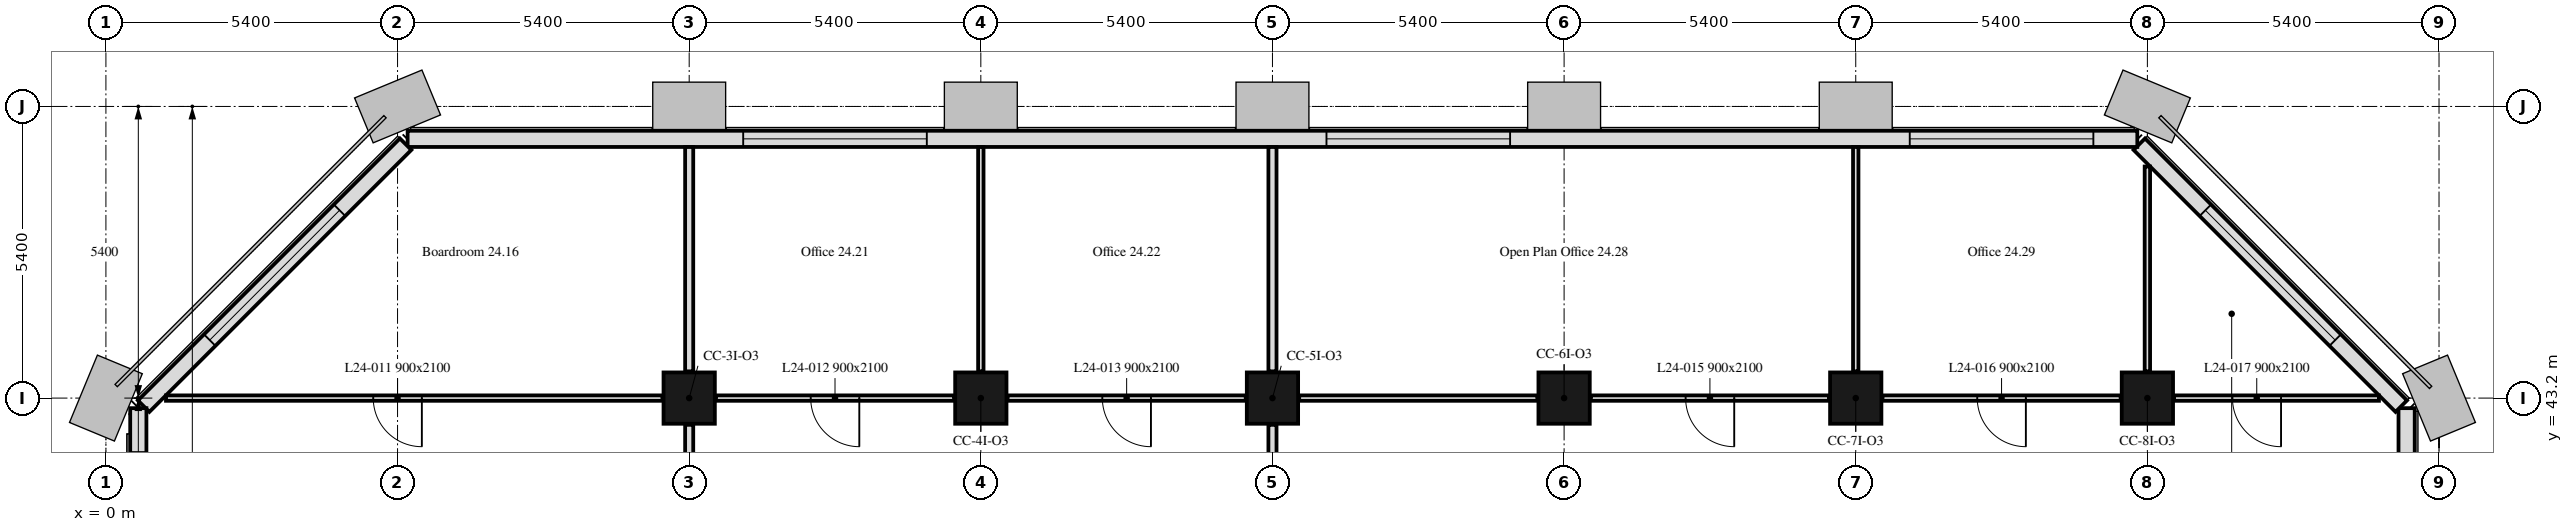
"""IFC4 building model, lengths in metres.
Left out: names, types, materials, properties, quantities, classifications, styles, units other than length and angle.
Written with IfcOpenShell. Run it as: python <this file> out.ifc"""

import sys

from ifc_helpers import new_model, si_unit, direction, frame, frame_2d, origin, origin_2d, place, context, subcontext, project, spatial, rectangle, extrude, element, fill, save


model = new_model("IFC4")
c1 = context("Model", 3, precision=1e-05, world=origin(), true_north=direction((0.0, 1.0)))
c2 = subcontext(c1, "Body", "Model", "MODEL_VIEW")
j1 = project(units=[si_unit("LENGTHUNIT", "METRE"), si_unit("PLANEANGLEUNIT", "RADIAN")], contexts=[c1])
p1 = place(None, origin())
s1 = spatial("IfcSite", under=j1, at=p1, CompositionType="ELEMENT")
p2 = place(p1, origin())
s2 = spatial("IfcBuilding", under=s1, at=p2, CompositionType="ELEMENT")
p3 = place(p2, frame((0.0, 0.0, 103.0)))
s3 = spatial("IfcBuildingStorey", under=s2, at=p3, CompositionType="ELEMENT", Elevation=103.0)
for number, where, z_axis, x_axis in (
    (1, (10.8, 43.2, 0.0), (0.0, 0.0, 1.0), (1.0, 0.0, 0.0)),
    (2, (16.2, 43.2, 0.0), (0.0, 0.0, 1.0), (1.0, 0.0, 0.0)),
    (3, (21.6, 43.2, 0.0), (0.0, 0.0, 1.0), (1.0, 0.0, 0.0)),
    (4, (27.0, 43.2, 0.0), (0.0, 0.0, 1.0), (1.0, 0.0, 0.0)),
    (5, (32.4, 43.2, 0.0), (0.0, 0.0, 1.0), (1.0, 0.0, 0.0)),
    (6, (37.8, 43.2, 0.0), (0.0, 0.0, 1.0), (1.0, 0.0, 0.0)),
):
    element("IfcColumn", number, at=place(p3, frame(where, z_axis=z_axis, x_axis=x_axis)), inside=s3, PredefinedType="COLUMN", context=c2, shape_type="SweptSolid", body=[
        extrude(rectangle(XDim=0.95, YDim=0.95, at=origin_2d()), origin(), (0.0, 0.0, 1.0), 3.5),
    ])
p4 = place(p3, frame((42.6, 32.4, 0.0), z_axis=(0.0, 0.0, 1.0), x_axis=(0.0, 1.0, 0.0)))
e7 = element("IfcWall", 7, at=p4, inside=s3, PredefinedType="SOLIDWALL", context=c2, shape_type="SweptSolid", body=[
    extrude(rectangle(XDim=10.614, YDim=0.3, at=frame_2d((5.307, 0.0))), origin(), (0.0, 0.0, 1.0), 3.5),
])
p5 = place(p4, frame((1.35, 0.0, 0.9)))
e8 = element("IfcOpeningElement", 8, at=p5, cuts=e7, PredefinedType="OPENING", context=c2, shape_type="SweptSolid", body=[
    extrude(rectangle(XDim=1.1, YDim=1.7, at=frame_2d((0.55, 0.85))), frame((0.0, 0.16, 0.0), z_axis=(0.0, -1.0, 0.0), x_axis=(1.0, 0.0, 0.0)), (0.0, 0.0, 1.0), 0.32),
])
p6 = place(p4, frame((2.95, 0.0, 0.9)))
e9 = element("IfcOpeningElement", 9, at=p6, cuts=e7, PredefinedType="OPENING", context=c2, shape_type="SweptSolid", body=[
    extrude(rectangle(XDim=1.1, YDim=1.7, at=frame_2d((0.55, 0.85))), frame((0.0, 0.16, 0.0), z_axis=(0.0, -1.0, 0.0), x_axis=(1.0, 0.0, 0.0)), (0.0, 0.0, 1.0), 0.32),
])
p7 = place(p3, frame((42.501, 43.051, 0.0), z_axis=(0.0, 0.0, 1.0), x_axis=(-0.707106781187, 0.707106781187, 0.0)))
e10 = element("IfcWall", 10, at=p7, inside=s3, PredefinedType="SOLIDWALL", context=c2, shape_type="SweptSolid", body=[
    extrude(rectangle(XDim=6.86, YDim=0.3, at=frame_2d((3.43, 0.0))), origin(), (0.0, 0.0, 1.0), 3.5),
])
p8 = place(p7, frame((1.73, 0.0, 0.9)))
e11 = element("IfcOpeningElement", 11, at=p8, cuts=e10, PredefinedType="OPENING", context=c2, shape_type="SweptSolid", body=[
    extrude(rectangle(XDim=3.4, YDim=1.7, at=frame_2d((1.7, 0.85))), frame((0.0, 0.16, 0.0), z_axis=(0.0, -1.0, 0.0), x_axis=(1.0, 0.0, 0.0)), (0.0, 0.0, 1.0), 0.32),
])
p9 = place(p3, frame((37.614, 48.0, 0.0), z_axis=(0.0, 0.0, 1.0), x_axis=(-1.0, 0.0, 0.0)))
e12 = element("IfcWall", 12, at=p9, inside=s3, PredefinedType="SOLIDWALL", context=c2, shape_type="SweptSolid", body=[
    extrude(rectangle(XDim=32.027, YDim=0.3, at=frame_2d((16.014, 0.0))), origin(), (0.0, 0.0, 1.0), 3.5),
])
p10 = place(p9, frame((0.814, 0.0, 0.9)))
e13 = element("IfcOpeningElement", 13, at=p10, cuts=e12, PredefinedType="OPENING", context=c2, shape_type="SweptSolid", body=[
    extrude(rectangle(XDim=3.4, YDim=1.7, at=frame_2d((1.7, 0.85))), frame((0.0, 0.16, 0.0), z_axis=(0.0, -1.0, 0.0), x_axis=(1.0, 0.0, 0.0)), (0.0, 0.0, 1.0), 0.32),
])
p11 = place(p9, frame((11.614, 0.0, 0.9)))
e14 = element("IfcOpeningElement", 14, at=p11, cuts=e12, PredefinedType="OPENING", context=c2, shape_type="SweptSolid", body=[
    extrude(rectangle(XDim=3.4, YDim=1.7, at=frame_2d((1.7, 0.85))), frame((0.0, 0.16, 0.0), z_axis=(0.0, -1.0, 0.0), x_axis=(1.0, 0.0, 0.0)), (0.0, 0.0, 1.0), 0.32),
])
p12 = place(p9, frame((22.414, 0.0, 0.9)))
e15 = element("IfcOpeningElement", 15, at=p12, cuts=e12, PredefinedType="OPENING", context=c2, shape_type="SweptSolid", body=[
    extrude(rectangle(XDim=3.4, YDim=1.7, at=frame_2d((1.7, 0.85))), frame((0.0, 0.16, 0.0), z_axis=(0.0, -1.0, 0.0), x_axis=(1.0, 0.0, 0.0)), (0.0, 0.0, 1.0), 0.32),
])
p13 = place(p3, frame((5.55, 47.901, 0.0), z_axis=(0.0, 0.0, 1.0), x_axis=(-0.707106781187, -0.707106781187, 0.0)))
e16 = element("IfcWall", 16, at=p13, inside=s3, PredefinedType="SOLIDWALL", context=c2, shape_type="SweptSolid", body=[
    extrude(rectangle(XDim=6.86, YDim=0.3, at=frame_2d((3.43, 0.0))), origin(), (0.0, 0.0, 1.0), 3.5),
])
p14 = place(p13, frame((1.73, 0.0, 0.9)))
e17 = element("IfcOpeningElement", 17, at=p14, cuts=e16, PredefinedType="OPENING", context=c2, shape_type="SweptSolid", body=[
    extrude(rectangle(XDim=3.4, YDim=1.7, at=frame_2d((1.7, 0.85))), frame((0.0, 0.16, 0.0), z_axis=(0.0, -1.0, 0.0), x_axis=(1.0, 0.0, 0.0)), (0.0, 0.0, 1.0), 0.32),
])
p15 = place(p3, frame((0.6, 43.014, 0.0), z_axis=(0.0, 0.0, 1.0), x_axis=(0.0, -1.0, 0.0)))
e18 = element("IfcWall", 18, at=p15, inside=s3, PredefinedType="SOLIDWALL", context=c2, shape_type="SweptSolid", body=[
    extrude(rectangle(XDim=32.027, YDim=0.3, at=frame_2d((16.014, 0.0))), origin(), (0.0, 0.0, 1.0), 3.5),
])
p16 = place(p15, frame((0.814, 0.0, 0.9)))
e19 = element("IfcOpeningElement", 19, at=p16, cuts=e18, PredefinedType="OPENING", context=c2, shape_type="SweptSolid", body=[
    extrude(rectangle(XDim=3.4, YDim=1.7, at=frame_2d((1.7, 0.85))), frame((0.0, 0.16, 0.0), z_axis=(0.0, -1.0, 0.0), x_axis=(1.0, 0.0, 0.0)), (0.0, 0.0, 1.0), 0.32),
])
p17 = place(p15, frame((11.614, 0.0, 0.9)))
e20 = element("IfcOpeningElement", 20, at=p17, cuts=e18, PredefinedType="OPENING", context=c2, shape_type="SweptSolid", body=[
    extrude(rectangle(XDim=3.4, YDim=1.7, at=frame_2d((1.7, 0.85))), frame((0.0, 0.16, 0.0), z_axis=(0.0, -1.0, 0.0), x_axis=(1.0, 0.0, 0.0)), (0.0, 0.0, 1.0), 0.32),
])
p18 = place(p15, frame((22.414, 0.0, 0.9)))
e21 = element("IfcOpeningElement", 21, at=p18, cuts=e18, PredefinedType="OPENING", context=c2, shape_type="SweptSolid", body=[
    extrude(rectangle(XDim=3.4, YDim=1.7, at=frame_2d((1.7, 0.85))), frame((0.0, 0.16, 0.0), z_axis=(0.0, -1.0, 0.0), x_axis=(1.0, 0.0, 0.0)), (0.0, 0.0, 1.0), 0.32),
])
p19 = place(p3, frame((10.305, 43.2, 0.0), z_axis=(0.0, 0.0, 1.0), x_axis=(-1.0, 0.0, 0.0)))
e22 = element("IfcWall", 22, at=p19, inside=s3, PredefinedType="PARTITIONING", context=c2, shape_type="SweptSolid", body=[
    extrude(rectangle(XDim=9.193, YDim=0.1, at=frame_2d((4.596, 0.0))), origin(), (0.0, 0.0, 1.0), 3.5),
])
p20 = place(p19, frame((4.455, 0.0, 0.0)))
e23 = element("IfcOpeningElement", 23, at=p20, cuts=e22, PredefinedType="OPENING", context=c2, shape_type="SweptSolid", body=[
    extrude(rectangle(XDim=0.9, YDim=2.1, at=frame_2d((0.45, 1.05))), frame((0.0, 0.05, 0.0), z_axis=(0.0, -1.0, 0.0), x_axis=(1.0, 0.0, 0.0)), (0.0, 0.0, 1.0), 0.1),
])
p21 = place(p3, frame((10.8, 38.295, 0.0), z_axis=(0.0, 0.0, 1.0), x_axis=(0.0, 1.0, 0.0)))
e24 = element("IfcWall", 24, at=p21, inside=s3, PredefinedType="PARTITIONING", context=c2, shape_type="SweptSolid", body=[
    extrude(rectangle(XDim=4.41, YDim=0.15, at=frame_2d((2.205, 0.0))), origin(), (0.0, 0.0, 1.0), 2.75),
])
p22 = place(p3, frame((10.8, 43.695, 0.0), z_axis=(0.0, 0.0, 1.0), x_axis=(0.0, 1.0, 0.0)))
e25 = element("IfcWall", 25, at=p22, inside=s3, PredefinedType="PARTITIONING", context=c2, shape_type="SweptSolid", body=[
    extrude(rectangle(XDim=4.154, YDim=0.15, at=frame_2d((2.077, 0.0))), origin(), (0.0, 0.0, 1.0), 2.75),
])
p23 = place(p3, frame((21.6, 38.295, 0.0), z_axis=(0.0, 0.0, 1.0), x_axis=(0.0, 1.0, 0.0)))
e26 = element("IfcWall", 26, at=p23, inside=s3, PredefinedType="PARTITIONING", context=c2, shape_type="SweptSolid", body=[
    extrude(rectangle(XDim=4.41, YDim=0.15, at=frame_2d((2.205, 0.0))), origin(), (0.0, 0.0, 1.0), 2.75),
])
p24 = place(p3, frame((21.105, 43.2, 0.0), z_axis=(0.0, 0.0, 1.0), x_axis=(-1.0, 0.0, 0.0)))
e27 = element("IfcWall", 27, at=p24, inside=s3, PredefinedType="PARTITIONING", context=c2, shape_type="SweptSolid", body=[
    extrude(rectangle(XDim=4.41, YDim=0.1, at=frame_2d((2.205, 0.0))), origin(), (0.0, 0.0, 1.0), 3.5),
])
p25 = place(p24, frame((1.755, 0.0, 0.0)))
e28 = element("IfcOpeningElement", 28, at=p25, cuts=e27, PredefinedType="OPENING", context=c2, shape_type="SweptSolid", body=[
    extrude(rectangle(XDim=0.9, YDim=2.1, at=frame_2d((0.45, 1.05))), frame((0.0, 0.05, 0.0), z_axis=(0.0, -1.0, 0.0), x_axis=(1.0, 0.0, 0.0)), (0.0, 0.0, 1.0), 0.1),
])
p26 = place(p3, frame((15.705, 43.2, 0.0), z_axis=(0.0, 0.0, 1.0), x_axis=(-1.0, 0.0, 0.0)))
e29 = element("IfcWall", 29, at=p26, inside=s3, PredefinedType="PARTITIONING", context=c2, shape_type="SweptSolid", body=[
    extrude(rectangle(XDim=4.41, YDim=0.1, at=frame_2d((2.205, 0.0))), origin(), (0.0, 0.0, 1.0), 3.5),
])
p27 = place(p26, frame((1.755, 0.0, 0.0)))
e30 = element("IfcOpeningElement", 30, at=p27, cuts=e29, PredefinedType="OPENING", context=c2, shape_type="SweptSolid", body=[
    extrude(rectangle(XDim=0.9, YDim=2.1, at=frame_2d((0.45, 1.05))), frame((0.0, 0.05, 0.0), z_axis=(0.0, -1.0, 0.0), x_axis=(1.0, 0.0, 0.0)), (0.0, 0.0, 1.0), 0.1),
])
p28 = place(p3, frame((16.2, 43.695, 0.0), z_axis=(0.0, 0.0, 1.0), x_axis=(0.0, 1.0, 0.0)))
e31 = element("IfcWall", 31, at=p28, inside=s3, PredefinedType="PARTITIONING", context=c2, shape_type="SweptSolid", body=[
    extrude(rectangle(XDim=4.154, YDim=0.1, at=frame_2d((2.077, 0.0))), origin(), (0.0, 0.0, 1.0), 2.75),
])
p29 = place(p3, frame((21.6, 43.695, 0.0), z_axis=(0.0, 0.0, 1.0), x_axis=(0.0, 1.0, 0.0)))
e32 = element("IfcWall", 32, at=p29, inside=s3, PredefinedType="PARTITIONING", context=c2, shape_type="SweptSolid", body=[
    extrude(rectangle(XDim=4.154, YDim=0.15, at=frame_2d((2.077, 0.0))), origin(), (0.0, 0.0, 1.0), 2.75),
])
p30 = place(p3, frame((42.088, 43.2, 0.0), z_axis=(0.0, 0.0, 1.0), x_axis=(-1.0, 0.0, 0.0)))
e33 = element("IfcWall", 33, at=p30, inside=s3, PredefinedType="PARTITIONING", context=c2, shape_type="SweptSolid", body=[
    extrude(rectangle(XDim=3.793, YDim=0.1, at=frame_2d((1.896, 0.0))), origin(), (0.0, 0.0, 1.0), 3.5),
])
p31 = place(p30, frame((1.813, 0.0, 0.0)))
e34 = element("IfcOpeningElement", 34, at=p31, cuts=e33, PredefinedType="OPENING", context=c2, shape_type="SweptSolid", body=[
    extrude(rectangle(XDim=0.9, YDim=2.1, at=frame_2d((0.45, 1.05))), frame((0.0, 0.05, 0.0), z_axis=(0.0, -1.0, 0.0), x_axis=(1.0, 0.0, 0.0)), (0.0, 0.0, 1.0), 0.1),
])
p32 = place(p3, frame((37.305, 43.2, 0.0), z_axis=(0.0, 0.0, 1.0), x_axis=(-1.0, 0.0, 0.0)))
e35 = element("IfcWall", 35, at=p32, inside=s3, PredefinedType="PARTITIONING", context=c2, shape_type="SweptSolid", body=[
    extrude(rectangle(XDim=4.41, YDim=0.1, at=frame_2d((2.205, 0.0))), origin(), (0.0, 0.0, 1.0), 3.5),
])
p33 = place(p32, frame((1.755, 0.0, 0.0)))
e36 = element("IfcOpeningElement", 36, at=p33, cuts=e35, PredefinedType="OPENING", context=c2, shape_type="SweptSolid", body=[
    extrude(rectangle(XDim=0.9, YDim=2.1, at=frame_2d((0.45, 1.05))), frame((0.0, 0.05, 0.0), z_axis=(0.0, -1.0, 0.0), x_axis=(1.0, 0.0, 0.0)), (0.0, 0.0, 1.0), 0.1),
])
p34 = place(p3, frame((31.905, 43.2, 0.0), z_axis=(0.0, 0.0, 1.0), x_axis=(-1.0, 0.0, 0.0)))
e37 = element("IfcWall", 37, at=p34, inside=s3, PredefinedType="PARTITIONING", context=c2, shape_type="SweptSolid", body=[
    extrude(rectangle(XDim=4.41, YDim=0.1, at=frame_2d((2.205, 0.0))), origin(), (0.0, 0.0, 1.0), 3.5),
])
p35 = place(p34, frame((1.755, 0.0, 0.0)))
e38 = element("IfcOpeningElement", 38, at=p35, cuts=e37, PredefinedType="OPENING", context=c2, shape_type="SweptSolid", body=[
    extrude(rectangle(XDim=0.9, YDim=2.1, at=frame_2d((0.45, 1.05))), frame((0.0, 0.05, 0.0), z_axis=(0.0, -1.0, 0.0), x_axis=(1.0, 0.0, 0.0)), (0.0, 0.0, 1.0), 0.1),
])
p36 = place(p3, frame((26.505, 43.2, 0.0), z_axis=(0.0, 0.0, 1.0), x_axis=(-1.0, 0.0, 0.0)))
e39 = element("IfcWall", 39, at=p36, inside=s3, PredefinedType="PARTITIONING", context=c2, shape_type="SweptSolid", body=[
    extrude(rectangle(XDim=4.41, YDim=0.1, at=frame_2d((2.205, 0.0))), origin(), (0.0, 0.0, 1.0), 3.5),
])
p37 = place(p3, frame((32.4, 43.695, 0.0), z_axis=(0.0, 0.0, 1.0), x_axis=(0.0, 1.0, 0.0)))
e40 = element("IfcWall", 40, at=p37, inside=s3, PredefinedType="PARTITIONING", context=c2, shape_type="SweptSolid", body=[
    extrude(rectangle(XDim=4.154, YDim=0.1, at=frame_2d((2.077, 0.0))), origin(), (0.0, 0.0, 1.0), 2.75),
])
p38 = place(p3, frame((37.8, 43.695, 0.0), z_axis=(0.0, 0.0, 1.0), x_axis=(0.0, 1.0, 0.0)))
e41 = element("IfcWall", 41, at=p38, inside=s3, PredefinedType="PARTITIONING", context=c2, shape_type="SweptSolid", body=[
    extrude(rectangle(XDim=3.793, YDim=0.1, at=frame_2d((1.896, 0.0))), origin(), (0.0, 0.0, 1.0), 3.5),
])
p39 = place(p8, origin())
e42 = element("IfcWindow", 42, at=p39, inside=s3, PartitioningType="SINGLE_PANEL", PredefinedType="WINDOW", context=c2, shape_type="SweptSolid", body=[
    extrude(rectangle(XDim=3.4, YDim=1.7, at=frame_2d((1.7, 0.85))), frame((0.0, 0.03, 0.0), z_axis=(0.0, -1.0, 0.0), x_axis=(1.0, 0.0, 0.0)), (0.0, 0.0, 1.0), 0.06),
])
fill(e11, e42)
p40 = place(p10, origin())
e43 = element("IfcWindow", 43, at=p40, inside=s3, PartitioningType="SINGLE_PANEL", PredefinedType="WINDOW", context=c2, shape_type="SweptSolid", body=[
    extrude(rectangle(XDim=3.4, YDim=1.7, at=frame_2d((1.7, 0.85))), frame((0.0, 0.03, 0.0), z_axis=(0.0, -1.0, 0.0), x_axis=(1.0, 0.0, 0.0)), (0.0, 0.0, 1.0), 0.06),
])
fill(e13, e43)
p41 = place(p11, origin())
e44 = element("IfcWindow", 44, at=p41, inside=s3, PartitioningType="SINGLE_PANEL", PredefinedType="WINDOW", context=c2, shape_type="SweptSolid", body=[
    extrude(rectangle(XDim=3.4, YDim=1.7, at=frame_2d((1.7, 0.85))), frame((0.0, 0.03, 0.0), z_axis=(0.0, -1.0, 0.0), x_axis=(1.0, 0.0, 0.0)), (0.0, 0.0, 1.0), 0.06),
])
fill(e14, e44)
p42 = place(p12, origin())
e45 = element("IfcWindow", 45, at=p42, inside=s3, PartitioningType="SINGLE_PANEL", PredefinedType="WINDOW", context=c2, shape_type="SweptSolid", body=[
    extrude(rectangle(XDim=3.4, YDim=1.7, at=frame_2d((1.7, 0.85))), frame((0.0, 0.03, 0.0), z_axis=(0.0, -1.0, 0.0), x_axis=(1.0, 0.0, 0.0)), (0.0, 0.0, 1.0), 0.06),
])
fill(e15, e45)
p43 = place(p14, origin())
e46 = element("IfcWindow", 46, at=p43, inside=s3, PartitioningType="SINGLE_PANEL", PredefinedType="WINDOW", context=c2, shape_type="SweptSolid", body=[
    extrude(rectangle(XDim=3.4, YDim=1.7, at=frame_2d((1.7, 0.85))), frame((0.0, 0.03, 0.0), z_axis=(0.0, -1.0, 0.0), x_axis=(1.0, 0.0, 0.0)), (0.0, 0.0, 1.0), 0.06),
])
fill(e17, e46)
p44 = place(p20, origin())
e47 = element("IfcDoor", 47, at=p44, inside=s3, OperationType="SINGLE_SWING_LEFT", PredefinedType="DOOR", context=c2, shape_type="SweptSolid", body=[
    extrude(rectangle(XDim=0.9, YDim=2.1, at=frame_2d((0.45, 1.05))), frame((0.0, 0.025, 0.0), z_axis=(0.0, -1.0, 0.0), x_axis=(1.0, 0.0, 0.0)), (0.0, 0.0, 1.0), 0.05),
])
fill(e23, e47)
p45 = place(p27, origin())
e48 = element("IfcDoor", 48, at=p45, inside=s3, OperationType="SINGLE_SWING_RIGHT", PredefinedType="DOOR", context=c2, shape_type="SweptSolid", body=[
    extrude(rectangle(XDim=0.9, YDim=2.1, at=frame_2d((0.45, 1.05))), frame((0.0, 0.025, 0.0), z_axis=(0.0, -1.0, 0.0), x_axis=(1.0, 0.0, 0.0)), (0.0, 0.0, 1.0), 0.05),
])
fill(e30, e48)
p46 = place(p25, origin())
e49 = element("IfcDoor", 49, at=p46, inside=s3, OperationType="SINGLE_SWING_RIGHT", PredefinedType="DOOR", context=c2, shape_type="SweptSolid", body=[
    extrude(rectangle(XDim=0.9, YDim=2.1, at=frame_2d((0.45, 1.05))), frame((0.0, 0.025, 0.0), z_axis=(0.0, -1.0, 0.0), x_axis=(1.0, 0.0, 0.0)), (0.0, 0.0, 1.0), 0.05),
])
fill(e28, e49)
p47 = place(p35, origin())
e50 = element("IfcDoor", 50, at=p47, inside=s3, OperationType="SINGLE_SWING_LEFT", PredefinedType="DOOR", context=c2, shape_type="SweptSolid", body=[
    extrude(rectangle(XDim=0.9, YDim=2.1, at=frame_2d((0.45, 1.05))), frame((0.0, 0.025, 0.0), z_axis=(0.0, -1.0, 0.0), x_axis=(1.0, 0.0, 0.0)), (0.0, 0.0, 1.0), 0.05),
])
fill(e38, e50)
p48 = place(p33, origin())
e51 = element("IfcDoor", 51, at=p48, inside=s3, OperationType="SINGLE_SWING_LEFT", PredefinedType="DOOR", context=c2, shape_type="SweptSolid", body=[
    extrude(rectangle(XDim=0.9, YDim=2.1, at=frame_2d((0.45, 1.05))), frame((0.0, 0.025, 0.0), z_axis=(0.0, -1.0, 0.0), x_axis=(1.0, 0.0, 0.0)), (0.0, 0.0, 1.0), 0.05),
])
fill(e36, e51)
p49 = place(p31, origin())
e52 = element("IfcDoor", 52, at=p49, inside=s3, OperationType="SINGLE_SWING_LEFT", PredefinedType="DOOR", context=c2, shape_type="SweptSolid", body=[
    extrude(rectangle(XDim=0.9, YDim=2.1, at=frame_2d((0.45, 1.05))), frame((0.0, 0.025, 0.0), z_axis=(0.0, -1.0, 0.0), x_axis=(1.0, 0.0, 0.0)), (0.0, 0.0, 1.0), 0.05),
])
fill(e34, e52)
save(model, sys.argv[1])
